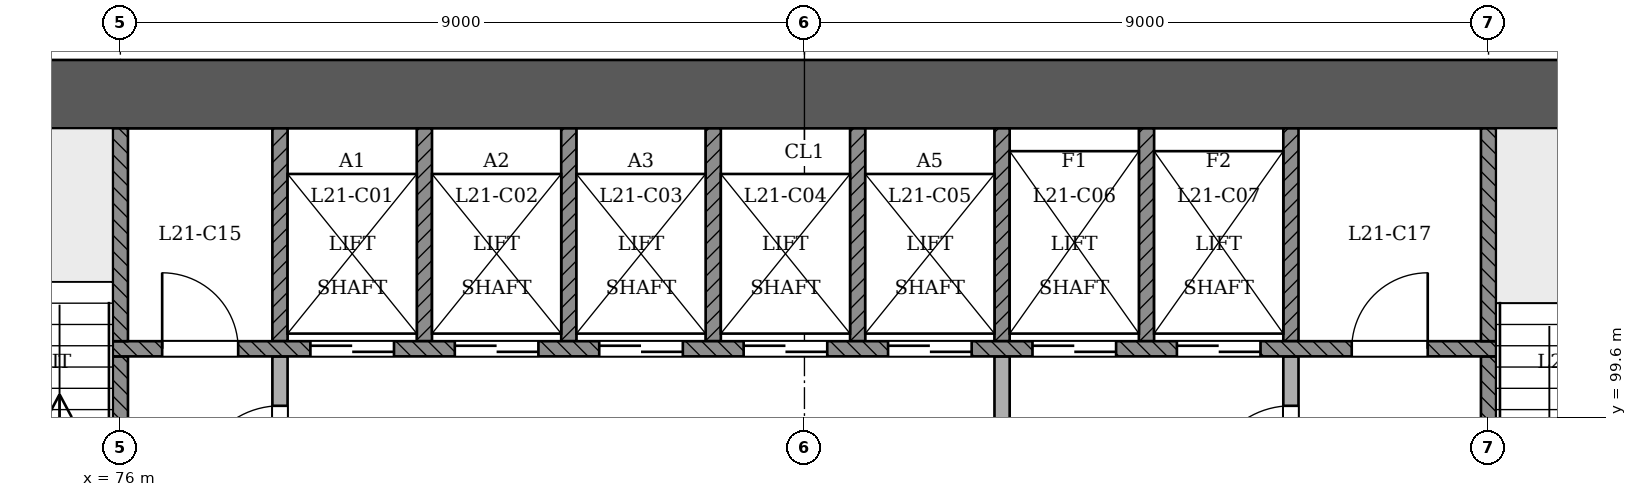
"""IFC4 building model, lengths in metres.
Left out: names, types, materials, properties, quantities, classifications, styles, units other than length and angle.
Written with IfcOpenShell. Run it as: python <this file> out.ifc"""

import sys

from ifc_helpers import new_model, si_unit, direction, frame, frame_2d, origin, place, context, subcontext, project, spatial, rectangle, extrude, element, fill, save


model = new_model("IFC4")
c1 = context("Model", 3, precision=1e-05, world=origin(), true_north=direction((0.0, 1.0)))
c2 = subcontext(c1, "Body", "Model", "MODEL_VIEW")
j1 = project(units=[si_unit("LENGTHUNIT", "METRE"), si_unit("PLANEANGLEUNIT", "RADIAN")], contexts=[c1])
p1 = place(None, origin())
s1 = spatial("IfcSite", under=j1, at=p1, CompositionType="ELEMENT")
p2 = place(p1, origin())
s2 = spatial("IfcBuilding", under=s1, at=p2, CompositionType="ELEMENT")
p3 = place(p2, frame((0.0, 0.0, 84.6)))
s3 = spatial("IfcBuildingStorey", under=s2, at=p3, CompositionType="ELEMENT", Elevation=84.6)
p4 = place(p3, frame((97.45, 103.85, 0.0), z_axis=(0.0, 0.0, 1.0), x_axis=(-1.0, 0.0, 0.0)))
e1 = element("IfcWall", 1, at=p4, inside=s3, PredefinedType="SHEAR", context=c2, shape_type="SweptSolid", body=[
    extrude(rectangle(XDim=25.35, YDim=0.9, at=frame_2d((12.675, 0.0))), origin(), (0.0, 0.0, 1.0), 3.6),
])
p5 = place(p3, frame((87.6, 93.4, 0.0), z_axis=(0.0, 0.0, 1.0), x_axis=(0.0, 1.0, 0.0)))
e2 = element("IfcWall", 2, at=p5, inside=s3, PredefinedType="PARTITIONING", context=c2, shape_type="SweptSolid", body=[
    extrude(rectangle(XDim=7.0, YDim=0.2, at=frame_2d((3.5, 0.0))), origin(), (0.0, 0.0, 1.0), 3.1),
])
p6 = place(p5, frame((4.45, 0.0, 0.0)))
e3 = element("IfcOpeningElement", 3, at=p6, cuts=e2, PredefinedType="OPENING", context=c2, shape_type="SweptSolid", body=[
    extrude(rectangle(XDim=1.1, YDim=2.1, at=frame_2d((0.55, 1.05))), frame((0.0, 0.11, 0.0), z_axis=(0.0, -1.0, 0.0), x_axis=(1.0, 0.0, 0.0)), (0.0, 0.0, 1.0), 0.221),
])
p7 = place(p3, frame((91.4, 96.2, 0.0), z_axis=(0.0, 0.0, 1.0), x_axis=(0.0, 1.0, 0.0)))
e4 = element("IfcWall", 4, at=p7, inside=s3, PredefinedType="PARTITIONING", context=c2, shape_type="SweptSolid", body=[
    extrude(rectangle(XDim=4.2, YDim=0.2, at=frame_2d((2.1, 0.0))), origin(), (0.0, 0.0, 1.0), 3.1),
])
p8 = place(p7, frame((2.45, 0.0, 0.0)))
e5 = element("IfcOpeningElement", 5, at=p8, cuts=e4, PredefinedType="OPENING", context=c2, shape_type="SweptSolid", body=[
    extrude(rectangle(XDim=1.1, YDim=2.1, at=frame_2d((0.55, 1.05))), frame((0.0, 0.11, 0.0), z_axis=(0.0, -1.0, 0.0), x_axis=(1.0, 0.0, 0.0)), (0.0, 0.0, 1.0), 0.221),
])
p9 = place(p3, frame((76.0, 96.7, 0.0), z_axis=(0.0, 0.0, 1.0), x_axis=(0.0, 1.0, 0.0)))
e6 = element("IfcWall", 6, at=p9, inside=s3, PredefinedType="SOLIDWALL", context=c2, shape_type="SweptSolid", body=[
    extrude(rectangle(XDim=3.7, YDim=0.2, at=frame_2d((1.85, 0.0))), origin(), (0.0, 0.0, 1.0), 3.1),
])
p10 = place(p9, frame((0.35, 0.0, 0.0)))
e7 = element("IfcOpeningElement", 7, at=p10, cuts=e6, PredefinedType="OPENING", context=c2, shape_type="SweptSolid", body=[
    extrude(rectangle(XDim=1.1, YDim=2.1, at=frame_2d((0.55, 1.05))), frame((0.0, 0.11, 0.0), z_axis=(0.0, -1.0, 0.0), x_axis=(1.0, 0.0, 0.0)), (0.0, 0.0, 1.0), 0.221),
])
p11 = place(p3, frame((78.1, 96.7, 0.0), z_axis=(0.0, 0.0, 1.0), x_axis=(0.0, 1.0, 0.0)))
e8 = element("IfcWall", 8, at=p11, inside=s3, PredefinedType="PARTITIONING", context=c2, shape_type="SweptSolid", body=[
    extrude(rectangle(XDim=3.7, YDim=0.2, at=frame_2d((1.85, 0.0))), origin(), (0.0, 0.0, 1.0), 3.1),
])
p12 = place(p11, frame((1.95, 0.0, 0.0)))
e9 = element("IfcOpeningElement", 9, at=p12, cuts=e8, PredefinedType="OPENING", context=c2, shape_type="SweptSolid", body=[
    extrude(rectangle(XDim=1.1, YDim=2.1, at=frame_2d((0.55, 1.05))), frame((0.0, 0.11, 0.0), z_axis=(0.0, -1.0, 0.0), x_axis=(1.0, 0.0, 0.0)), (0.0, 0.0, 1.0), 0.221),
])
p13 = place(p3, frame((94.0, 96.7, 0.0), z_axis=(0.0, 0.0, 1.0), x_axis=(0.0, 1.0, 0.0)))
e10 = element("IfcWall", 10, at=p13, inside=s3, PredefinedType="SOLIDWALL", context=c2, shape_type="SweptSolid", body=[
    extrude(rectangle(XDim=3.7, YDim=0.2, at=frame_2d((1.85, 0.0))), origin(), (0.0, 0.0, 1.0), 3.1),
])
p14 = place(p13, frame((0.35, 0.0, 0.0)))
e11 = element("IfcOpeningElement", 11, at=p14, cuts=e10, PredefinedType="OPENING", context=c2, shape_type="SweptSolid", body=[
    extrude(rectangle(XDim=1.1, YDim=2.1, at=frame_2d((0.55, 1.05))), frame((0.0, 0.11, 0.0), z_axis=(0.0, -1.0, 0.0), x_axis=(1.0, 0.0, 0.0)), (0.0, 0.0, 1.0), 0.221),
])
p15 = place(p3, frame((75.9, 100.5, 0.0), z_axis=(0.0, 0.0, 1.0), x_axis=(1.0, 0.0, 0.0)))
e12 = element("IfcWall", 12, at=p15, inside=s3, PredefinedType="SOLIDWALL", context=c2, shape_type="SweptSolid", body=[
    extrude(rectangle(XDim=18.2, YDim=0.2, at=frame_2d((9.1, 0.0))), origin(), (0.0, 0.0, 1.0), 3.1),
])
p16 = place(p15, frame((2.6, 0.0, 0.0)))
e13 = element("IfcOpeningElement", 13, at=p16, cuts=e12, PredefinedType="OPENING", context=c2, shape_type="SweptSolid", body=[
    extrude(rectangle(XDim=1.1, YDim=2.1, at=frame_2d((0.55, 1.05))), frame((0.0, 0.11, 0.0), z_axis=(0.0, -1.0, 0.0), x_axis=(1.0, 0.0, 0.0)), (0.0, 0.0, 1.0), 0.221),
])
p17 = place(p15, frame((4.5, 0.0, 0.0)))
e14 = element("IfcOpeningElement", 14, at=p17, cuts=e12, PredefinedType="OPENING", context=c2, shape_type="SweptSolid", body=[
    extrude(rectangle(XDim=1.1, YDim=2.1, at=frame_2d((0.55, 1.05))), frame((0.0, 0.11, 0.0), z_axis=(0.0, -1.0, 0.0), x_axis=(1.0, 0.0, 0.0)), (0.0, 0.0, 1.0), 0.221),
])
p18 = place(p15, frame((6.4, 0.0, 0.0)))
e15 = element("IfcOpeningElement", 15, at=p18, cuts=e12, PredefinedType="OPENING", context=c2, shape_type="SweptSolid", body=[
    extrude(rectangle(XDim=1.1, YDim=2.1, at=frame_2d((0.55, 1.05))), frame((0.0, 0.11, 0.0), z_axis=(0.0, -1.0, 0.0), x_axis=(1.0, 0.0, 0.0)), (0.0, 0.0, 1.0), 0.221),
])
p19 = place(p15, frame((8.3, 0.0, 0.0)))
e16 = element("IfcOpeningElement", 16, at=p19, cuts=e12, PredefinedType="OPENING", context=c2, shape_type="SweptSolid", body=[
    extrude(rectangle(XDim=1.1, YDim=2.1, at=frame_2d((0.55, 1.05))), frame((0.0, 0.11, 0.0), z_axis=(0.0, -1.0, 0.0), x_axis=(1.0, 0.0, 0.0)), (0.0, 0.0, 1.0), 0.221),
])
p20 = place(p15, frame((10.2, 0.0, 0.0)))
e17 = element("IfcOpeningElement", 17, at=p20, cuts=e12, PredefinedType="OPENING", context=c2, shape_type="SweptSolid", body=[
    extrude(rectangle(XDim=1.1, YDim=2.1, at=frame_2d((0.55, 1.05))), frame((0.0, 0.11, 0.0), z_axis=(0.0, -1.0, 0.0), x_axis=(1.0, 0.0, 0.0)), (0.0, 0.0, 1.0), 0.221),
])
p21 = place(p15, frame((12.1, 0.0, 0.0)))
e18 = element("IfcOpeningElement", 18, at=p21, cuts=e12, PredefinedType="OPENING", context=c2, shape_type="SweptSolid", body=[
    extrude(rectangle(XDim=1.1, YDim=2.1, at=frame_2d((0.55, 1.05))), frame((0.0, 0.11, 0.0), z_axis=(0.0, -1.0, 0.0), x_axis=(1.0, 0.0, 0.0)), (0.0, 0.0, 1.0), 0.221),
])
p22 = place(p15, frame((14.0, 0.0, 0.0)))
e19 = element("IfcOpeningElement", 19, at=p22, cuts=e12, PredefinedType="OPENING", context=c2, shape_type="SweptSolid", body=[
    extrude(rectangle(XDim=1.1, YDim=2.1, at=frame_2d((0.55, 1.05))), frame((0.0, 0.11, 0.0), z_axis=(0.0, -1.0, 0.0), x_axis=(1.0, 0.0, 0.0)), (0.0, 0.0, 1.0), 0.221),
])
p23 = place(p15, frame((0.65, 0.0, 0.0)))
e20 = element("IfcOpeningElement", 20, at=p23, cuts=e12, PredefinedType="OPENING", context=c2, shape_type="SweptSolid", body=[
    extrude(rectangle(XDim=1.0, YDim=2.1, at=frame_2d((0.5, 1.05))), frame((0.0, 0.11, 0.0), z_axis=(0.0, -1.0, 0.0), x_axis=(1.0, 0.0, 0.0)), (0.0, 0.0, 1.0), 0.221),
])
p24 = place(p15, frame((16.3, 0.0, 0.0)))
e21 = element("IfcOpeningElement", 21, at=p24, cuts=e12, PredefinedType="OPENING", context=c2, shape_type="SweptSolid", body=[
    extrude(rectangle(XDim=1.0, YDim=2.1, at=frame_2d((0.5, 1.05))), frame((0.0, 0.11, 0.0), z_axis=(0.0, -1.0, 0.0), x_axis=(1.0, 0.0, 0.0)), (0.0, 0.0, 1.0), 0.221),
])
for number, where, z_axis, x_axis in (
    (22, (76.0, 100.6, 0.0), (0.0, 0.0, 1.0), (0.0, 1.0, 0.0)),
    (23, (78.1, 100.6, 0.0), (0.0, 0.0, 1.0), (0.0, 1.0, 0.0)),
    (24, (80.0, 100.6, 0.0), (0.0, 0.0, 1.0), (0.0, 1.0, 0.0)),
    (25, (81.9, 100.6, 0.0), (0.0, 0.0, 1.0), (0.0, 1.0, 0.0)),
    (26, (83.8, 100.6, 0.0), (0.0, 0.0, 1.0), (0.0, 1.0, 0.0)),
    (27, (85.7, 100.6, 0.0), (0.0, 0.0, 1.0), (0.0, 1.0, 0.0)),
    (28, (87.6, 100.6, 0.0), (0.0, 0.0, 1.0), (0.0, 1.0, 0.0)),
    (29, (89.5, 100.6, 0.0), (0.0, 0.0, 1.0), (0.0, 1.0, 0.0)),
    (30, (91.4, 100.6, 0.0), (0.0, 0.0, 1.0), (0.0, 1.0, 0.0)),
    (31, (94.0, 100.6, 0.0), (0.0, 0.0, 1.0), (0.0, 1.0, 0.0)),
):
    element("IfcWall", number, at=place(p3, frame(where, z_axis=z_axis, x_axis=x_axis)), inside=s3, PredefinedType="SOLIDWALL", context=c2, shape_type="SweptSolid", body=[
        extrude(rectangle(XDim=2.8, YDim=0.2, at=frame_2d((1.4, 0.0))), origin(), (0.0, 0.0, 1.0), 3.1),
    ])
p25 = place(p16, origin())
e32 = element("IfcDoor", 32, at=p25, inside=s3, OperationType="SLIDING_TO_RIGHT", PredefinedType="NOTDEFINED", context=c2, shape_type="SweptSolid", body=[
    extrude(rectangle(XDim=1.1, YDim=2.1, at=frame_2d((0.55, 1.05))), frame((0.0, 0.025, 0.0), z_axis=(0.0, -1.0, 0.0), x_axis=(1.0, 0.0, 0.0)), (0.0, 0.0, 1.0), 0.05),
])
fill(e13, e32)
p26 = place(p17, origin())
e33 = element("IfcDoor", 33, at=p26, inside=s3, OperationType="SLIDING_TO_LEFT", PredefinedType="NOTDEFINED", context=c2, shape_type="SweptSolid", body=[
    extrude(rectangle(XDim=1.1, YDim=2.1, at=frame_2d((0.55, 1.05))), frame((0.0, 0.025, 0.0), z_axis=(0.0, -1.0, 0.0), x_axis=(1.0, 0.0, 0.0)), (0.0, 0.0, 1.0), 0.05),
])
fill(e14, e33)
p27 = place(p18, origin())
e34 = element("IfcDoor", 34, at=p27, inside=s3, OperationType="SLIDING_TO_RIGHT", PredefinedType="NOTDEFINED", context=c2, shape_type="SweptSolid", body=[
    extrude(rectangle(XDim=1.1, YDim=2.1, at=frame_2d((0.55, 1.05))), frame((0.0, 0.025, 0.0), z_axis=(0.0, -1.0, 0.0), x_axis=(1.0, 0.0, 0.0)), (0.0, 0.0, 1.0), 0.05),
])
fill(e15, e34)
p28 = place(p19, origin())
e35 = element("IfcDoor", 35, at=p28, inside=s3, OperationType="SLIDING_TO_LEFT", PredefinedType="NOTDEFINED", context=c2, shape_type="SweptSolid", body=[
    extrude(rectangle(XDim=1.1, YDim=2.1, at=frame_2d((0.55, 1.05))), frame((0.0, 0.025, 0.0), z_axis=(0.0, -1.0, 0.0), x_axis=(1.0, 0.0, 0.0)), (0.0, 0.0, 1.0), 0.05),
])
fill(e16, e35)
p29 = place(p20, origin())
e36 = element("IfcDoor", 36, at=p29, inside=s3, OperationType="SLIDING_TO_RIGHT", PredefinedType="NOTDEFINED", context=c2, shape_type="SweptSolid", body=[
    extrude(rectangle(XDim=1.1, YDim=2.1, at=frame_2d((0.55, 1.05))), frame((0.0, 0.025, 0.0), z_axis=(0.0, -1.0, 0.0), x_axis=(1.0, 0.0, 0.0)), (0.0, 0.0, 1.0), 0.05),
])
fill(e17, e36)
p30 = place(p21, origin())
e37 = element("IfcDoor", 37, at=p30, inside=s3, OperationType="SLIDING_TO_RIGHT", PredefinedType="NOTDEFINED", context=c2, shape_type="SweptSolid", body=[
    extrude(rectangle(XDim=1.1, YDim=2.1, at=frame_2d((0.55, 1.05))), frame((0.0, 0.025, 0.0), z_axis=(0.0, -1.0, 0.0), x_axis=(1.0, 0.0, 0.0)), (0.0, 0.0, 1.0), 0.05),
])
fill(e18, e37)
p31 = place(p22, origin())
e38 = element("IfcDoor", 38, at=p31, inside=s3, OperationType="SLIDING_TO_LEFT", PredefinedType="NOTDEFINED", context=c2, shape_type="SweptSolid", body=[
    extrude(rectangle(XDim=1.1, YDim=2.1, at=frame_2d((0.55, 1.05))), frame((0.0, 0.025, 0.0), z_axis=(0.0, -1.0, 0.0), x_axis=(1.0, 0.0, 0.0)), (0.0, 0.0, 1.0), 0.05),
])
fill(e19, e38)
p32 = place(p12, origin())
e39 = element("IfcDoor", 39, at=p32, inside=s3, OperationType="SINGLE_SWING_LEFT", PredefinedType="NOTDEFINED", context=c2, shape_type="SweptSolid", body=[
    extrude(rectangle(XDim=1.1, YDim=2.1, at=frame_2d((0.55, 1.05))), frame((0.0, 0.025, 0.0), z_axis=(0.0, -1.0, 0.0), x_axis=(1.0, 0.0, 0.0)), (0.0, 0.0, 1.0), 0.05),
])
fill(e9, e39)
p33 = place(p8, origin())
e40 = element("IfcDoor", 40, at=p33, inside=s3, OperationType="SINGLE_SWING_LEFT", PredefinedType="NOTDEFINED", context=c2, shape_type="SweptSolid", body=[
    extrude(rectangle(XDim=1.1, YDim=2.1, at=frame_2d((0.55, 1.05))), frame((0.0, 0.025, 0.0), z_axis=(0.0, -1.0, 0.0), x_axis=(1.0, 0.0, 0.0)), (0.0, 0.0, 1.0), 0.05),
])
fill(e5, e40)
p34 = place(p23, origin())
e41 = element("IfcDoor", 41, at=p34, inside=s3, OperationType="SINGLE_SWING_LEFT", PredefinedType="NOTDEFINED", context=c2, shape_type="SweptSolid", body=[
    extrude(rectangle(XDim=1.0, YDim=2.1, at=frame_2d((0.5, 1.05))), frame((0.0, 0.025, 0.0), z_axis=(0.0, -1.0, 0.0), x_axis=(1.0, 0.0, 0.0)), (0.0, 0.0, 1.0), 0.05),
])
fill(e20, e41)
p35 = place(p24, origin())
e42 = element("IfcDoor", 42, at=p35, inside=s3, OperationType="SINGLE_SWING_RIGHT", PredefinedType="NOTDEFINED", context=c2, shape_type="SweptSolid", body=[
    extrude(rectangle(XDim=1.0, YDim=2.1, at=frame_2d((0.5, 1.05))), frame((0.0, 0.025, 0.0), z_axis=(0.0, -1.0, 0.0), x_axis=(1.0, 0.0, 0.0)), (0.0, 0.0, 1.0), 0.05),
])
fill(e21, e42)
save(model, sys.argv[1])
